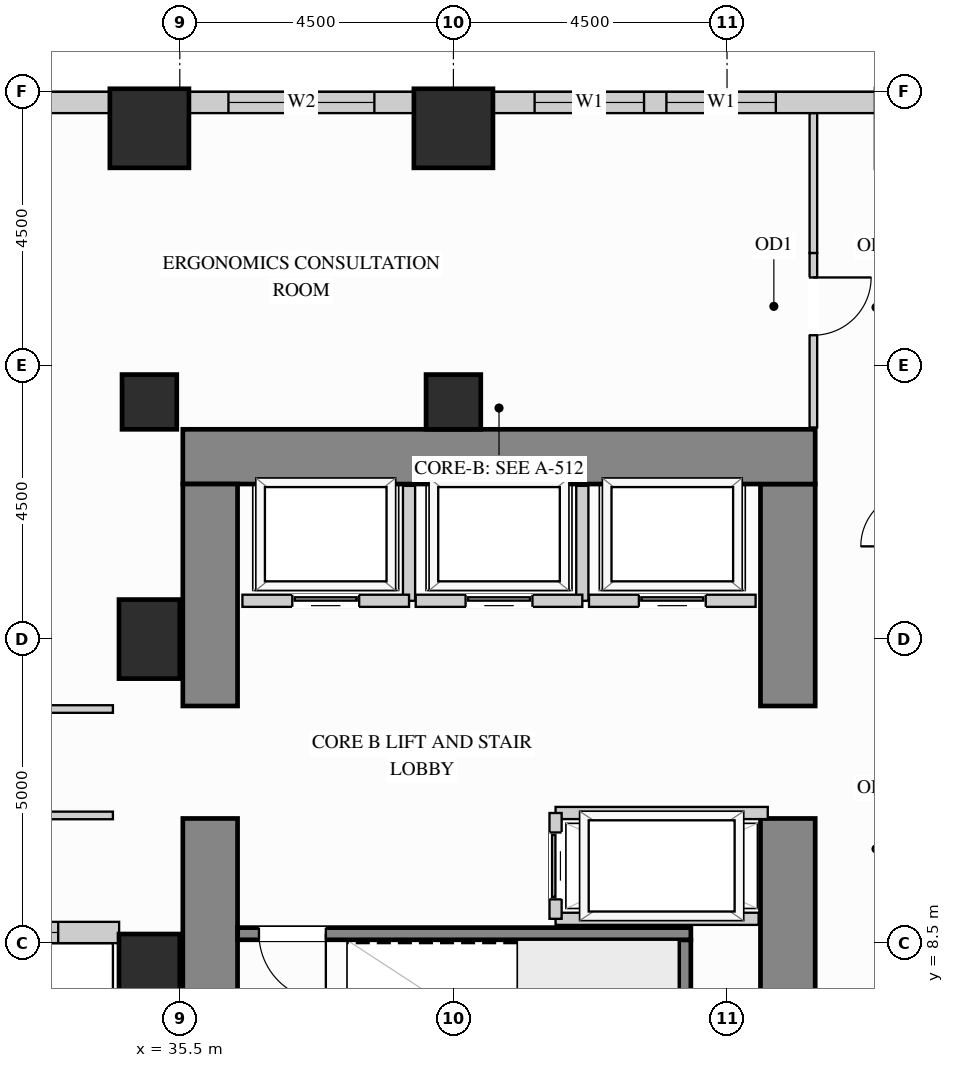
"""IFC4 building model, lengths in metres.
Left out: names, types, materials, properties, quantities, classifications, styles, units other than length and angle.
Written with IfcOpenShell. Run it as: python <this file> out.ifc"""

import sys

from ifc_helpers import new_model, si_unit, direction, frame, frame_2d, origin, origin_2d, place, context, subcontext, project, spatial, rectangle, extrude, source, transform, mapped, element, fill, save


model = new_model("IFC4")
c1 = context("Model", 3, precision=1e-05, world=origin(), true_north=direction((0.0, 1.0)))
c2 = subcontext(c1, "Body", "Model", "MODEL_VIEW")
j1 = project(units=[si_unit("LENGTHUNIT", "METRE"), si_unit("PLANEANGLEUNIT", "RADIAN")], contexts=[c1])
p1 = place(None, origin())
s1 = spatial("IfcSite", under=j1, at=p1, CompositionType="ELEMENT")
p2 = place(p1, origin())
s2 = spatial("IfcBuilding", under=s1, at=p2, CompositionType="ELEMENT")
p3 = place(p2, frame((0.0, 0.0, 54.9)))
s3 = spatial("IfcBuildingStorey", under=s2, at=p3, CompositionType="ELEMENT", Elevation=54.9)
m1 = source(origin(), c2, "Body", "SweptSolid", [
    extrude(rectangle(XDim=0.9, YDim=0.9, at=origin_2d()), origin(), (0.0, 0.0, 1.0), 3.38),
])
for number, where, z_axis, x_axis in (
    (1, (35.0, 17.4, 0.0), (0.0, 0.0, 1.0), (1.0, 0.0, 0.0)),
    (2, (40.0, 17.4, 0.0), (0.0, 0.0, 1.0), (1.0, 0.0, 0.0)),
):
    element("IfcColumn", number, at=place(p3, frame(where, z_axis=z_axis, x_axis=x_axis)), inside=s3, PredefinedType="COLUMN", context=c2, shape_type="MappedRepresentation", body=[
        mapped(m1, transform((0.0, 0.0, 0.0), x_axis=(1.0, 0.0, 0.0), y_axis=(0.0, 1.0, 0.0), z_axis=(0.0, 0.0, 1.0))),
    ])
m2 = source(origin(), c2, "Body", "SweptSolid", [
    extrude(rectangle(XDim=1.0, YDim=1.3, at=origin_2d()), origin(), (0.0, 0.0, 1.0), 3.38),
])
for number, where, z_axis, x_axis in (
    (3, (35.0, 13.5, 0.0), (0.0, 0.0, 1.0), (1.0, 0.0, 0.0)),
    (4, (35.0, 8.0, 0.0), (0.0, 0.0, 1.0), (1.0, 0.0, 0.0)),
):
    element("IfcColumn", number, at=place(p3, frame(where, z_axis=z_axis, x_axis=x_axis)), inside=s3, PredefinedType="COLUMN", context=c2, shape_type="MappedRepresentation", body=[
        mapped(m2, transform((0.0, 0.0, 0.0), x_axis=(1.0, 0.0, 0.0), y_axis=(0.0, 1.0, 0.0), z_axis=(0.0, 0.0, 1.0))),
    ])
m3 = source(origin(), c2, "Body", "SweptSolid", [
    extrude(rectangle(XDim=1.3, YDim=1.3, at=origin_2d()), origin(), (0.0, 0.0, 1.0), 3.38),
])
for number, where, z_axis, x_axis in (
    (5, (35.0, 21.9, 0.0), (0.0, 0.0, 1.0), (1.0, 0.0, 0.0)),
    (6, (40.0, 21.9, 0.0), (0.0, 0.0, 1.0), (1.0, 0.0, 0.0)),
):
    element("IfcColumn", number, at=place(p3, frame(where, z_axis=z_axis, x_axis=x_axis)), inside=s3, PredefinedType="COLUMN", context=c2, shape_type="MappedRepresentation", body=[
        mapped(m3, transform((0.0, 0.0, 0.0), x_axis=(1.0, 0.0, 0.0), y_axis=(0.0, 1.0, 0.0), z_axis=(0.0, 0.0, 1.0))),
    ])
m4 = source(origin(), c2, "Body", "SweptSolid", [
    extrude(rectangle(XDim=5.6, YDim=0.9, at=frame_2d((2.8, 0.0))), origin(), (0.0, 0.0, 1.0), 3.38),
])
p4 = place(p3, frame((45.5, 4.95, 0.0), z_axis=(0.0, 0.0, 1.0), x_axis=(0.0, 1.0, 0.0)))
e7 = element("IfcWall", 7, at=p4, inside=s3, PredefinedType="SHEAR", context=c2, shape_type="MappedRepresentation", body=[
    mapped(m4, transform((0.0, 0.0, 0.0), x_axis=(1.0, 0.0, 0.0), y_axis=(0.0, 1.0, 0.0), z_axis=(0.0, 0.0, 1.0))),
])
m5 = source(origin(), c2, "Body", "SweptSolid", [
    extrude(rectangle(XDim=3.65, YDim=0.9, at=frame_2d((1.825, 0.0))), origin(), (0.0, 0.0, 1.0), 3.38),
])
p5 = place(p3, frame((45.5, 12.4, 0.0), z_axis=(0.0, 0.0, 1.0), x_axis=(0.0, 1.0, 0.0)))
e8 = element("IfcWall", 8, at=p5, inside=s3, PredefinedType="SHEAR", context=c2, shape_type="MappedRepresentation", body=[
    mapped(m5, transform((0.0, 0.0, 0.0), x_axis=(1.0, 0.0, 0.0), y_axis=(0.0, 1.0, 0.0), z_axis=(0.0, 0.0, 1.0))),
])
m6 = source(origin(), c2, "Body", "SweptSolid", [
    extrude(rectangle(XDim=10.4, YDim=0.9, at=frame_2d((5.2, 0.0))), origin(), (0.0, 0.0, 1.0), 3.38),
])
p6 = place(p3, frame((35.55, 16.5, 0.0), z_axis=(0.0, 0.0, 1.0), x_axis=(1.0, 0.0, 0.0)))
e9 = element("IfcWall", 9, at=p6, inside=s3, PredefinedType="SHEAR", context=c2, shape_type="MappedRepresentation", body=[
    mapped(m6, transform((0.0, 0.0, 0.0), x_axis=(1.0, 0.0, 0.0), y_axis=(0.0, 1.0, 0.0), z_axis=(0.0, 0.0, 1.0))),
])
p7 = place(p3, frame((36.0, 4.95, 0.0), z_axis=(0.0, 0.0, 1.0), x_axis=(0.0, 1.0, 0.0)))
e10 = element("IfcWall", 10, at=p7, inside=s3, PredefinedType="SHEAR", context=c2, shape_type="MappedRepresentation", body=[
    mapped(m4, transform((0.0, 0.0, 0.0), x_axis=(1.0, 0.0, 0.0), y_axis=(0.0, 1.0, 0.0), z_axis=(0.0, 0.0, 1.0))),
])
p8 = place(p3, frame((36.0, 12.4, 0.0), z_axis=(0.0, 0.0, 1.0), x_axis=(0.0, 1.0, 0.0)))
e11 = element("IfcWall", 11, at=p8, inside=s3, PredefinedType="SHEAR", context=c2, shape_type="MappedRepresentation", body=[
    mapped(m5, transform((0.0, 0.0, 0.0), x_axis=(1.0, 0.0, 0.0), y_axis=(0.0, 1.0, 0.0), z_axis=(0.0, 0.0, 1.0))),
])
p9 = place(p3, frame((30.998, 8.675, 0.0), z_axis=(0.0, 0.0, 1.0), x_axis=(1.0, 0.0, 0.0)))
e12 = element("IfcWall", 12, at=p9, inside=s3, PredefinedType="SOLIDWALL", context=c2, shape_type="SweptSolid", body=[
    extrude(rectangle(XDim=3.504, YDim=0.35, at=frame_2d((1.752, 0.0))), origin(), (0.0, 0.0, 1.0), 3.365),
])
p10 = place(p9, frame((1.002, 0.0, 0.78)))
e13 = element("IfcOpeningElement", 13, at=p10, cuts=e12, PredefinedType="OPENING", context=c2, shape_type="SweptSolid", body=[
    extrude(rectangle(XDim=1.5, YDim=2.0, at=frame_2d((0.75, 1.0))), frame((0.0, 0.185, 0.0), z_axis=(0.0, -1.0, 0.0), x_axis=(1.0, 0.0, 0.0)), (0.0, 0.0, 1.0), 0.37),
])
p11 = place(p3, frame((46.952, 22.325, 0.0), z_axis=(0.0, 0.0, 1.0), x_axis=(-1.0, 0.0, 0.0)))
e14 = element("IfcWall", 14, at=p11, inside=s3, PredefinedType="SOLIDWALL", context=c2, shape_type="SweptSolid", body=[
    extrude(rectangle(XDim=6.304, YDim=0.35, at=frame_2d((3.152, 0.0))), origin(), (0.0, 0.0, 1.0), 2.51),
])
p12 = place(p11, frame((1.649, 0.0, 0.78)))
e15 = element("IfcOpeningElement", 15, at=p12, cuts=e14, PredefinedType="OPENING", context=c2, shape_type="SweptSolid", body=[
    extrude(rectangle(XDim=1.8, YDim=1.55, at=frame_2d((0.9, 0.775))), frame((0.0, 0.185, 0.0), z_axis=(0.0, -1.0, 0.0), x_axis=(1.0, 0.0, 0.0)), (0.0, 0.0, 1.0), 0.37),
])
p13 = place(p11, frame((3.817, 0.0, 0.78)))
e16 = element("IfcOpeningElement", 16, at=p13, cuts=e14, PredefinedType="OPENING", context=c2, shape_type="SweptSolid", body=[
    extrude(rectangle(XDim=1.8, YDim=1.55, at=frame_2d((0.9, 0.775))), frame((0.0, 0.185, 0.0), z_axis=(0.0, -1.0, 0.0), x_axis=(1.0, 0.0, 0.0)), (0.0, 0.0, 1.0), 0.37),
])
p14 = place(p3, frame((39.352, 22.325, 0.0), z_axis=(0.0, 0.0, 1.0), x_axis=(-1.0, 0.0, 0.0)))
e17 = element("IfcWall", 17, at=p14, inside=s3, PredefinedType="SOLIDWALL", context=c2, shape_type="SweptSolid", body=[
    extrude(rectangle(XDim=3.704, YDim=0.35, at=frame_2d((1.852, 0.0))), origin(), (0.0, 0.0, 1.0), 2.51),
])
p15 = place(p14, frame((0.652, 0.0, 0.78)))
e18 = element("IfcOpeningElement", 18, at=p15, cuts=e17, PredefinedType="OPENING", context=c2, shape_type="SweptSolid", body=[
    extrude(rectangle(XDim=2.4, YDim=1.55, at=frame_2d((1.2, 0.775))), frame((0.0, 0.185, 0.0), z_axis=(0.0, -1.0, 0.0), x_axis=(1.0, 0.0, 0.0)), (0.0, 0.0, 1.0), 0.37),
])
p16 = place(p3, frame((34.352, 22.325, 0.0), z_axis=(0.0, 0.0, 1.0), x_axis=(-1.0, 0.0, 0.0)))
e19 = element("IfcWall", 19, at=p16, inside=s3, PredefinedType="SOLIDWALL", context=c2, shape_type="SweptSolid", body=[
    extrude(rectangle(XDim=14.854, YDim=0.35, at=frame_2d((7.427, 0.0))), origin(), (0.0, 0.0, 1.0), 3.365),
])
p17 = place(p16, frame((4.058, 0.0, 0.78)))
e20 = element("IfcOpeningElement", 20, at=p17, cuts=e19, PredefinedType="OPENING", context=c2, shape_type="SweptSolid", body=[
    extrude(rectangle(XDim=1.5, YDim=2.0, at=frame_2d((0.75, 1.0))), frame((0.0, 0.185, 0.0), z_axis=(0.0, -1.0, 0.0), x_axis=(1.0, 0.0, 0.0)), (0.0, 0.0, 1.0), 0.37),
])
p18 = place(p16, frame((9.296, 0.0, 0.78)))
e21 = element("IfcOpeningElement", 21, at=p18, cuts=e19, PredefinedType="OPENING", context=c2, shape_type="SweptSolid", body=[
    extrude(rectangle(XDim=1.5, YDim=2.0, at=frame_2d((0.75, 1.0))), frame((0.0, 0.185, 0.0), z_axis=(0.0, -1.0, 0.0), x_axis=(1.0, 0.0, 0.0)), (0.0, 0.0, 1.0), 0.37),
])
p19 = place(p3, frame((45.92, 16.98, 0.0), z_axis=(0.0, 0.0, 1.0), x_axis=(0.0, 1.0, 0.0)))
e22 = element("IfcWall", 22, at=p19, inside=s3, PredefinedType="PARTITIONING", context=c2, shape_type="SweptSolid", body=[
    extrude(rectangle(XDim=2.87, YDim=0.125, at=frame_2d((1.435, 0.0))), origin(), (0.0, 0.0, 1.0), 3.365),
])
p20 = place(p19, frame((1.517, 0.0, 0.0)))
e23 = element("IfcOpeningElement", 23, at=p20, cuts=e22, PredefinedType="OPENING", context=c2, shape_type="SweptSolid", body=[
    extrude(rectangle(XDim=0.95, YDim=2.15, at=frame_2d((0.475, 1.075))), frame((0.0, 0.073, 0.0), z_axis=(0.0, -1.0, 0.0), x_axis=(1.0, 0.0, 0.0)), (0.0, 0.0, 1.0), 0.145),
])
m7 = source(origin(), c2, "Body", "SweptSolid", [
    extrude(rectangle(XDim=2.298, YDim=0.125, at=frame_2d((1.149, 0.0))), origin(), (0.0, 0.0, 1.0), 3.365),
])
p21 = place(p3, frame((45.92, 19.85, 0.0), z_axis=(0.0, 0.0, 1.0), x_axis=(0.0, 1.0, 0.0)))
e24 = element("IfcWall", 24, at=p21, inside=s3, PredefinedType="PARTITIONING", context=c2, shape_type="MappedRepresentation", body=[
    mapped(m7, transform((0.0, 0.0, 0.0), x_axis=(1.0, 0.0, 0.0), y_axis=(0.0, 1.0, 0.0), z_axis=(0.0, 0.0, 1.0))),
])
p22 = place(p3, frame((29.85, 12.35, 0.0), z_axis=(0.0, 0.0, 1.0), x_axis=(1.0, 0.0, 0.0)))
e25 = element("IfcWall", 25, at=p22, inside=s3, PredefinedType="PARTITIONING", context=c2, shape_type="SweptSolid", body=[
    extrude(rectangle(XDim=4.55, YDim=0.125, at=frame_2d((2.275, 0.0))), origin(), (0.0, 0.0, 1.0), 3.365),
])
p23 = place(p22, frame((1.8, 0.0, 0.0)))
e26 = element("IfcOpeningElement", 26, at=p23, cuts=e25, PredefinedType="OPENING", context=c2, shape_type="SweptSolid", body=[
    extrude(rectangle(XDim=0.95, YDim=2.15, at=frame_2d((0.475, 1.075))), frame((0.0, 0.073, 0.0), z_axis=(0.0, -1.0, 0.0), x_axis=(1.0, 0.0, 0.0)), (0.0, 0.0, 1.0), 0.145),
])
p24 = place(p3, frame((19.5, 10.6, 0.0), z_axis=(0.0, 0.0, 1.0), x_axis=(1.0, 0.0, 0.0)))
e27 = element("IfcWall", 27, at=p24, inside=s3, PredefinedType="PARTITIONING", context=c2, shape_type="SweptSolid", body=[
    extrude(rectangle(XDim=14.9, YDim=0.125, at=frame_2d((7.45, 0.0))), origin(), (0.0, 0.0, 1.0), 3.365),
])
p25 = place(p24, frame((6.975, 0.0, 0.0)))
e28 = element("IfcOpeningElement", 28, at=p25, cuts=e27, PredefinedType="OPENING", context=c2, shape_type="SweptSolid", body=[
    extrude(rectangle(XDim=0.95, YDim=2.15, at=frame_2d((0.475, 1.075))), frame((0.0, 0.073, 0.0), z_axis=(0.0, -1.0, 0.0), x_axis=(1.0, 0.0, 0.0)), (0.0, 0.0, 1.0), 0.145),
])
m8 = source(origin(), c2, "Body", "SweptSolid", [
    extrude(rectangle(XDim=1.89, YDim=0.2, at=frame_2d((0.945, 0.0))), origin(), (0.0, 0.0, 1.0), 3.365),
])
p26 = place(p3, frame((39.27, 14.13, 0.0), z_axis=(0.0, 0.0, 1.0), x_axis=(0.0, 1.0, 0.0)))
e29 = element("IfcWall", 29, at=p26, inside=s3, PredefinedType="PARTITIONING", context=c2, shape_type="MappedRepresentation", body=[
    mapped(m8, transform((0.0, 0.0, 0.0), x_axis=(1.0, 0.0, 0.0), y_axis=(0.0, 1.0, 0.0), z_axis=(0.0, 0.0, 1.0))),
])
p27 = place(p3, frame((36.53, 14.13, 0.0), z_axis=(0.0, 0.0, 1.0), x_axis=(1.0, 0.0, 0.0)))
e30 = element("IfcWall", 30, at=p27, inside=s3, PredefinedType="PARTITIONING", context=c2, shape_type="SweptSolid", body=[
    extrude(rectangle(XDim=2.74, YDim=0.2, at=frame_2d((1.37, 0.0))), origin(), (0.0, 0.0, 1.0), 3.365),
])
p28 = place(p27, frame((0.82, 0.0, 0.0)))
e31 = element("IfcOpeningElement", 31, at=p28, cuts=e30, PredefinedType="OPENING", context=c2, shape_type="SweptSolid", body=[
    extrude(rectangle(XDim=1.1, YDim=2.2, at=frame_2d((0.55, 1.1))), frame((0.0, 0.11, 0.0), z_axis=(0.0, -1.0, 0.0), x_axis=(1.0, 0.0, 0.0)), (0.0, 0.0, 1.0), 0.22),
])
p29 = place(p3, frame((42.12, 14.13, 0.0), z_axis=(0.0, 0.0, 1.0), x_axis=(0.0, 1.0, 0.0)))
e32 = element("IfcWall", 32, at=p29, inside=s3, PredefinedType="PARTITIONING", context=c2, shape_type="MappedRepresentation", body=[
    mapped(m8, transform((0.0, 0.0, 0.0), x_axis=(1.0, 0.0, 0.0), y_axis=(0.0, 1.0, 0.0), z_axis=(0.0, 0.0, 1.0))),
])
p30 = place(p3, frame((39.38, 14.13, 0.0), z_axis=(0.0, 0.0, 1.0), x_axis=(1.0, 0.0, 0.0)))
e33 = element("IfcWall", 33, at=p30, inside=s3, PredefinedType="PARTITIONING", context=c2, shape_type="SweptSolid", body=[
    extrude(rectangle(XDim=2.74, YDim=0.2, at=frame_2d((1.37, 0.0))), origin(), (0.0, 0.0, 1.0), 3.365),
])
p31 = place(p30, frame((0.82, 0.0, 0.0)))
e34 = element("IfcOpeningElement", 34, at=p31, cuts=e33, PredefinedType="OPENING", context=c2, shape_type="SweptSolid", body=[
    extrude(rectangle(XDim=1.1, YDim=2.2, at=frame_2d((0.55, 1.1))), frame((0.0, 0.11, 0.0), z_axis=(0.0, -1.0, 0.0), x_axis=(1.0, 0.0, 0.0)), (0.0, 0.0, 1.0), 0.22),
])
p32 = place(p3, frame((42.23, 14.13, 0.0), z_axis=(0.0, 0.0, 1.0), x_axis=(1.0, 0.0, 0.0)))
e35 = element("IfcWall", 35, at=p32, inside=s3, PredefinedType="PARTITIONING", context=c2, shape_type="SweptSolid", body=[
    extrude(rectangle(XDim=2.74, YDim=0.2, at=frame_2d((1.37, 0.0))), origin(), (0.0, 0.0, 1.0), 3.365),
])
p33 = place(p32, frame((0.82, 0.0, 0.0)))
e36 = element("IfcOpeningElement", 36, at=p33, cuts=e35, PredefinedType="OPENING", context=c2, shape_type="SweptSolid", body=[
    extrude(rectangle(XDim=1.1, YDim=2.2, at=frame_2d((0.55, 1.1))), frame((0.0, 0.11, 0.0), z_axis=(0.0, -1.0, 0.0), x_axis=(1.0, 0.0, 0.0)), (0.0, 0.0, 1.0), 0.22),
])
m9 = source(origin(), c2, "Body", "SweptSolid", [
    extrude(rectangle(XDim=3.49, YDim=0.2, at=frame_2d((1.745, 0.0))), origin(), (0.0, 0.0, 1.0), 3.365),
])
p34 = place(p3, frame((41.68, 10.64, 0.0), z_axis=(0.0, 0.0, 1.0), x_axis=(1.0, 0.0, 0.0)))
e37 = element("IfcWall", 37, at=p34, inside=s3, PredefinedType="PARTITIONING", context=c2, shape_type="MappedRepresentation", body=[
    mapped(m9, transform((0.0, 0.0, 0.0), x_axis=(1.0, 0.0, 0.0), y_axis=(0.0, 1.0, 0.0), z_axis=(0.0, 0.0, 1.0))),
])
m10 = source(origin(), c2, "Body", "SweptSolid", [
    extrude(rectangle(XDim=3.34, YDim=0.2, at=frame_2d((1.67, 0.0))), origin(), (0.0, 0.0, 1.0), 3.365),
])
p35 = place(p3, frame((41.68, 8.9, 0.0), z_axis=(0.0, 0.0, 1.0), x_axis=(1.0, 0.0, 0.0)))
e38 = element("IfcWall", 38, at=p35, inside=s3, PredefinedType="PARTITIONING", context=c2, shape_type="MappedRepresentation", body=[
    mapped(m10, transform((0.0, 0.0, 0.0), x_axis=(1.0, 0.0, 0.0), y_axis=(0.0, 1.0, 0.0), z_axis=(0.0, 0.0, 1.0))),
])
p36 = place(p3, frame((41.68, 8.9, 0.0), z_axis=(0.0, 0.0, 1.0), x_axis=(0.0, 1.0, 0.0)))
e39 = element("IfcWall", 39, at=p36, inside=s3, PredefinedType="PARTITIONING", context=c2, shape_type="SweptSolid", body=[
    extrude(rectangle(XDim=1.74, YDim=0.2, at=frame_2d((0.87, 0.0))), origin(), (0.0, 0.0, 1.0), 3.365),
])
p37 = place(p36, frame((0.32, 0.0, 0.0)))
e40 = element("IfcOpeningElement", 40, at=p37, cuts=e39, PredefinedType="OPENING", context=c2, shape_type="SweptSolid", body=[
    extrude(rectangle(XDim=1.1, YDim=2.2, at=frame_2d((0.55, 1.1))), frame((0.0, 0.11, 0.0), z_axis=(0.0, -1.0, 0.0), x_axis=(1.0, 0.0, 0.0)), (0.0, 0.0, 1.0), 0.22),
])
m11 = source(origin(), c2, "Body", "SweptSolid", [
    extrude(rectangle(XDim=3.603, YDim=0.2, at=frame_2d((1.802, 0.0))), origin(), (0.0, 0.0, 1.0), 3.38),
])
p38 = place(p3, frame((43.805, 4.952, 0.0), z_axis=(0.0, 0.0, 1.0), x_axis=(0.0, 1.0, 0.0)))
e41 = element("IfcWall", 41, at=p38, inside=s3, PredefinedType="SHEAR", context=c2, shape_type="MappedRepresentation", body=[
    mapped(m11, transform((0.0, 0.0, 0.0), x_axis=(1.0, 0.0, 0.0), y_axis=(0.0, 1.0, 0.0), z_axis=(0.0, 0.0, 1.0))),
])
p39 = place(p3, frame((36.452, 8.655, 0.0), z_axis=(0.0, 0.0, 1.0), x_axis=(1.0, 0.0, 0.0)))
e42 = element("IfcWall", 42, at=p39, inside=s3, PredefinedType="SHEAR", context=c2, shape_type="SweptSolid", body=[
    extrude(rectangle(XDim=7.453, YDim=0.2, at=frame_2d((3.727, 0.0))), origin(), (0.0, 0.0, 1.0), 3.38),
])
p40 = place(p39, frame((0.35, 0.0, 0.0)))
e43 = element("IfcOpeningElement", 43, at=p40, cuts=e42, PredefinedType="OPENING", context=c2, shape_type="SweptSolid", body=[
    extrude(rectangle(XDim=1.1, YDim=2.15, at=frame_2d((0.55, 1.075))), frame((0.0, 0.11, 0.0), z_axis=(0.0, -1.0, 0.0), x_axis=(1.0, 0.0, 0.0)), (0.0, 0.0, 1.0), 0.22),
])
m12 = source(origin(), c2, "Body", "SweptSolid", [
    extrude(rectangle(XDim=1.1, YDim=2.2, at=frame_2d((0.55, 1.1))), frame((0.0, 0.025, 0.0), z_axis=(0.0, -1.0, 0.0), x_axis=(1.0, 0.0, 0.0)), (0.0, 0.0, 1.0), 0.05),
])
p41 = place(p28, origin())
e44 = element("IfcDoor", 44, at=p41, inside=s3, OperationType="SLIDING_TO_LEFT", PredefinedType="DOOR", context=c2, shape_type="MappedRepresentation", body=[
    mapped(m12, transform((0.0, 0.0, 0.0), x_axis=(1.0, 0.0, 0.0), y_axis=(0.0, 1.0, 0.0), z_axis=(0.0, 0.0, 1.0))),
])
fill(e31, e44)
p42 = place(p31, origin())
e45 = element("IfcDoor", 45, at=p42, inside=s3, OperationType="SLIDING_TO_LEFT", PredefinedType="DOOR", context=c2, shape_type="MappedRepresentation", body=[
    mapped(m12, transform((0.0, 0.0, 0.0), x_axis=(1.0, 0.0, 0.0), y_axis=(0.0, 1.0, 0.0), z_axis=(0.0, 0.0, 1.0))),
])
fill(e34, e45)
p43 = place(p33, origin())
e46 = element("IfcDoor", 46, at=p43, inside=s3, OperationType="SLIDING_TO_LEFT", PredefinedType="DOOR", context=c2, shape_type="MappedRepresentation", body=[
    mapped(m12, transform((0.0, 0.0, 0.0), x_axis=(1.0, 0.0, 0.0), y_axis=(0.0, 1.0, 0.0), z_axis=(0.0, 0.0, 1.0))),
])
fill(e36, e46)
p44 = place(p37, origin())
e47 = element("IfcDoor", 47, at=p44, inside=s3, OperationType="SLIDING_TO_LEFT", PredefinedType="DOOR", context=c2, shape_type="MappedRepresentation", body=[
    mapped(m12, transform((0.0, 0.0, 0.0), x_axis=(1.0, 0.0, 0.0), y_axis=(0.0, 1.0, 0.0), z_axis=(0.0, 0.0, 1.0))),
])
fill(e40, e47)
m13 = source(origin(), c2, "Body", "SweptSolid", [
    extrude(rectangle(XDim=0.95, YDim=2.15, at=frame_2d((0.475, 1.075))), frame((0.0, 0.025, 0.0), z_axis=(0.0, -1.0, 0.0), x_axis=(1.0, 0.0, 0.0)), (0.0, 0.0, 1.0), 0.05),
])
p45 = place(p20, origin())
e48 = element("IfcDoor", 48, at=p45, inside=s3, OperationType="SINGLE_SWING_RIGHT", PredefinedType="DOOR", context=c2, shape_type="MappedRepresentation", body=[
    mapped(m13, transform((0.0, 0.0, 0.0), x_axis=(1.0, 0.0, 0.0), y_axis=(0.0, 1.0, 0.0), z_axis=(0.0, 0.0, 1.0))),
])
fill(e23, e48)
m14 = source(origin(), c2, "Body", "SweptSolid", [
    extrude(rectangle(XDim=1.1, YDim=2.15, at=frame_2d((0.55, 1.075))), frame((0.0, 0.025, 0.0), z_axis=(0.0, -1.0, 0.0), x_axis=(1.0, 0.0, 0.0)), (0.0, 0.0, 1.0), 0.05),
])
p46 = place(p40, origin())
e49 = element("IfcDoor", 49, at=p46, inside=s3, OperationType="SINGLE_SWING_RIGHT", PredefinedType="DOOR", context=c2, shape_type="MappedRepresentation", body=[
    mapped(m14, transform((0.0, 0.0, 0.0), x_axis=(1.0, 0.0, 0.0), y_axis=(0.0, 1.0, 0.0), z_axis=(0.0, 0.0, 1.0))),
])
fill(e43, e49)
m15 = source(origin(), c2, "Body", "SweptSolid", [
    extrude(rectangle(XDim=1.8, YDim=1.55, at=frame_2d((0.9, 0.775))), frame((0.0, 0.03, 0.0), z_axis=(0.0, -1.0, 0.0), x_axis=(1.0, 0.0, 0.0)), (0.0, 0.0, 1.0), 0.06),
])
p47 = place(p12, origin())
e50 = element("IfcWindow", 50, at=p47, inside=s3, PartitioningType="SINGLE_PANEL", PredefinedType="WINDOW", context=c2, shape_type="MappedRepresentation", body=[
    mapped(m15, transform((0.0, 0.0, 0.0), x_axis=(1.0, 0.0, 0.0), y_axis=(0.0, 1.0, 0.0), z_axis=(0.0, 0.0, 1.0))),
])
fill(e15, e50)
p48 = place(p13, origin())
e51 = element("IfcWindow", 51, at=p48, inside=s3, PartitioningType="SINGLE_PANEL", PredefinedType="WINDOW", context=c2, shape_type="MappedRepresentation", body=[
    mapped(m15, transform((0.0, 0.0, 0.0), x_axis=(1.0, 0.0, 0.0), y_axis=(0.0, 1.0, 0.0), z_axis=(0.0, 0.0, 1.0))),
])
fill(e16, e51)
m16 = source(origin(), c2, "Body", "SweptSolid", [
    extrude(rectangle(XDim=2.4, YDim=1.55, at=frame_2d((1.2, 0.775))), frame((0.0, 0.03, 0.0), z_axis=(0.0, -1.0, 0.0), x_axis=(1.0, 0.0, 0.0)), (0.0, 0.0, 1.0), 0.06),
])
p49 = place(p15, origin())
e52 = element("IfcWindow", 52, at=p49, inside=s3, PartitioningType="SINGLE_PANEL", PredefinedType="WINDOW", context=c2, shape_type="MappedRepresentation", body=[
    mapped(m16, transform((0.0, 0.0, 0.0), x_axis=(1.0, 0.0, 0.0), y_axis=(0.0, 1.0, 0.0), z_axis=(0.0, 0.0, 1.0))),
])
fill(e18, e52)
m17 = source(origin(), c2, "Body", "SweptSolid", [
    extrude(rectangle(XDim=1.5, YDim=2.0, at=frame_2d((0.75, 1.0))), frame((0.0, 0.03, 0.0), z_axis=(0.0, -1.0, 0.0), x_axis=(1.0, 0.0, 0.0)), (0.0, 0.0, 1.0), 0.06),
])
p50 = place(p10, origin())
e53 = element("IfcWindow", 53, at=p50, inside=s3, PartitioningType="SINGLE_PANEL", PredefinedType="WINDOW", context=c2, shape_type="MappedRepresentation", body=[
    mapped(m17, transform((0.0, 0.0, 0.0), x_axis=(1.0, 0.0, 0.0), y_axis=(0.0, 1.0, 0.0), z_axis=(0.0, 0.0, 1.0))),
])
fill(e13, e53)
save(model, sys.argv[1])
